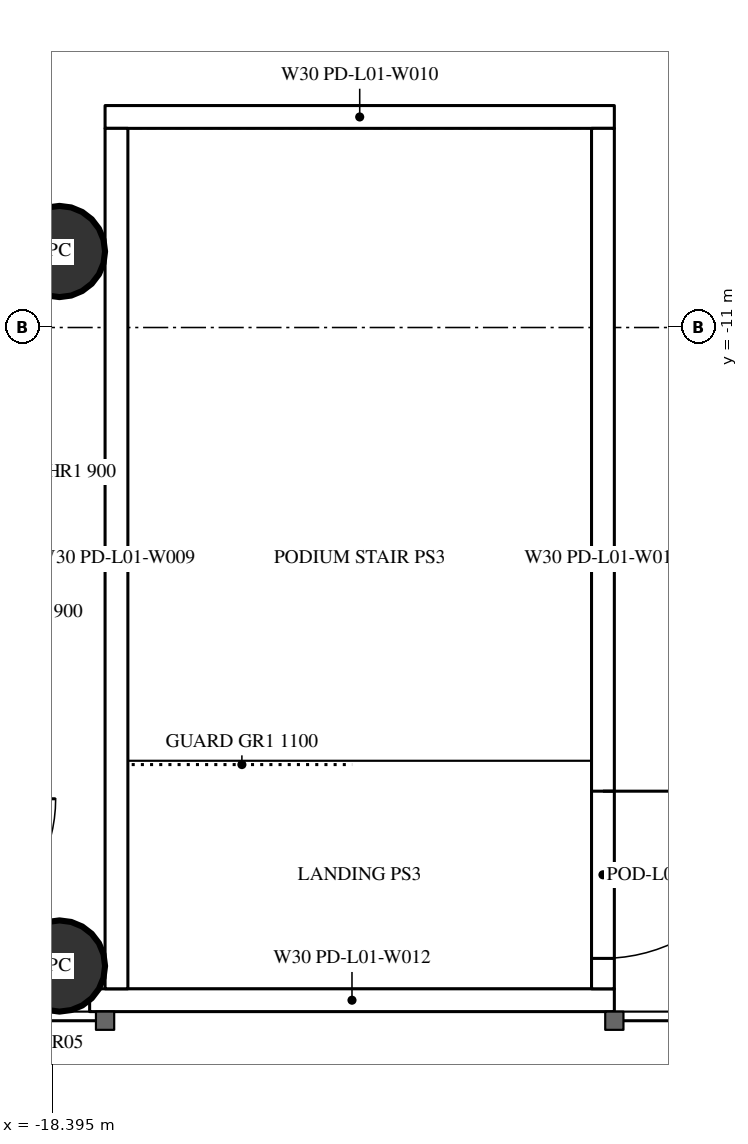
"""IFC4 building model, lengths in metres.
Left out: names, types, materials, properties, quantities, classifications, styles, units other than length and angle.
Written with IfcOpenShell. Run it as: python <this file> out.ifc"""

import sys

from ifc_helpers import new_model, si_unit, direction, frame, frame_2d, origin, origin_2d, place, context, subcontext, project, spatial, rectangle, circle, extrude, element, fill, save


model = new_model("IFC4")
c1 = context("Model", 3, precision=1e-05, world=origin(), true_north=direction((0.0, 1.0)))
c2 = subcontext(c1, "Body", "Model", "MODEL_VIEW")
j1 = project(units=[si_unit("LENGTHUNIT", "METRE"), si_unit("PLANEANGLEUNIT", "RADIAN")], contexts=[c1])
p1 = place(None, origin())
s1 = spatial("IfcSite", under=j1, at=p1, CompositionType="ELEMENT")
p2 = place(p1, origin())
s2 = spatial("IfcBuilding", under=s1, at=p2, CompositionType="ELEMENT")
p3 = place(p2, frame((0.0, 0.0, 7.2)))
s3 = spatial("IfcBuildingStorey", under=s2, at=p3, CompositionType="ELEMENT", Elevation=7.2)
for number, where, z_axis, x_axis in (
    (1, (-18.3, -19.4, 0.0), (0.0, 0.0, 1.0), (1.0, 0.0, 0.0)),
    (2, (-18.3, -10.0, 0.0), (0.0, 0.0, 1.0), (1.0, 0.0, 0.0)),
):
    element("IfcColumn", number, at=place(p3, frame(where, z_axis=z_axis, x_axis=x_axis)), inside=s3, PredefinedType="COLUMN", context=c2, shape_type="SweptSolid", body=[
        extrude(circle(Radius=0.6, at=origin_2d()), origin(), (0.0, 0.0, 1.0), 5.4),
    ])
p4 = place(p3, frame((-11.0, -19.85, 0.0), z_axis=(0.0, 0.0, 1.0), x_axis=(-1.0, 0.0, 0.0)))
e3 = element("IfcWall", 3, at=p4, inside=s3, PredefinedType="SOLIDWALL", context=c2, shape_type="SweptSolid", body=[
    extrude(rectangle(XDim=6.903, YDim=0.3, at=frame_2d((3.452, 0.0))), origin(), (0.0, 0.0, 1.0), 5.05),
])
p5 = place(p3, frame((-17.7, -8.23, 0.0), z_axis=(0.0, 0.0, 1.0), x_axis=(1.0, 0.0, 0.0)))
e4 = element("IfcWall", 4, at=p5, inside=s3, PredefinedType="SOLIDWALL", context=c2, shape_type="SweptSolid", body=[
    extrude(rectangle(XDim=6.7, YDim=0.3, at=frame_2d((3.35, 0.0))), origin(), (0.0, 0.0, 1.0), 5.05),
])
p6 = place(p3, frame((-11.15, -8.38, 0.0), z_axis=(0.0, 0.0, 1.0), x_axis=(0.0, -1.0, 0.0)))
e5 = element("IfcWall", 5, at=p6, inside=s3, PredefinedType="SOLIDWALL", context=c2, shape_type="SweptSolid", body=[
    extrude(rectangle(XDim=11.32, YDim=0.3, at=frame_2d((5.66, 0.0))), origin(), (0.0, 0.0, 1.0), 5.05),
])
p7 = place(p6, frame((8.72, 0.0, 0.0)))
e6 = element("IfcOpeningElement", 6, at=p7, cuts=e5, PredefinedType="OPENING", context=c2, shape_type="SweptSolid", body=[
    extrude(rectangle(XDim=2.2, YDim=2.2, at=frame_2d((1.1, 1.1))), frame((0.0, 0.16, 0.0), z_axis=(0.0, -1.0, 0.0), x_axis=(1.0, 0.0, 0.0)), (0.0, 0.0, 1.0), 0.32),
])
p8 = place(p3, frame((-17.55, -8.38, 0.0), z_axis=(0.0, 0.0, 1.0), x_axis=(0.0, -1.0, 0.0)))
e7 = element("IfcWall", 7, at=p8, inside=s3, PredefinedType="SOLIDWALL", context=c2, shape_type="SweptSolid", body=[
    extrude(rectangle(XDim=11.32, YDim=0.3, at=frame_2d((5.66, 0.0))), origin(), (0.0, 0.0, 1.0), 5.05),
])
p9 = place(p7, origin())
e8 = element("IfcDoor", 8, at=p9, inside=s3, OperationType="DOUBLE_DOOR_SINGLE_SWING", PredefinedType="DOOR", context=c2, shape_type="SweptSolid", body=[
    extrude(rectangle(XDim=2.2, YDim=2.2, at=frame_2d((1.1, 1.1))), frame((0.0, 0.025, 0.0), z_axis=(0.0, -1.0, 0.0), x_axis=(1.0, 0.0, 0.0)), (0.0, 0.0, 1.0), 0.05),
])
fill(e6, e8)
save(model, sys.argv[1])
